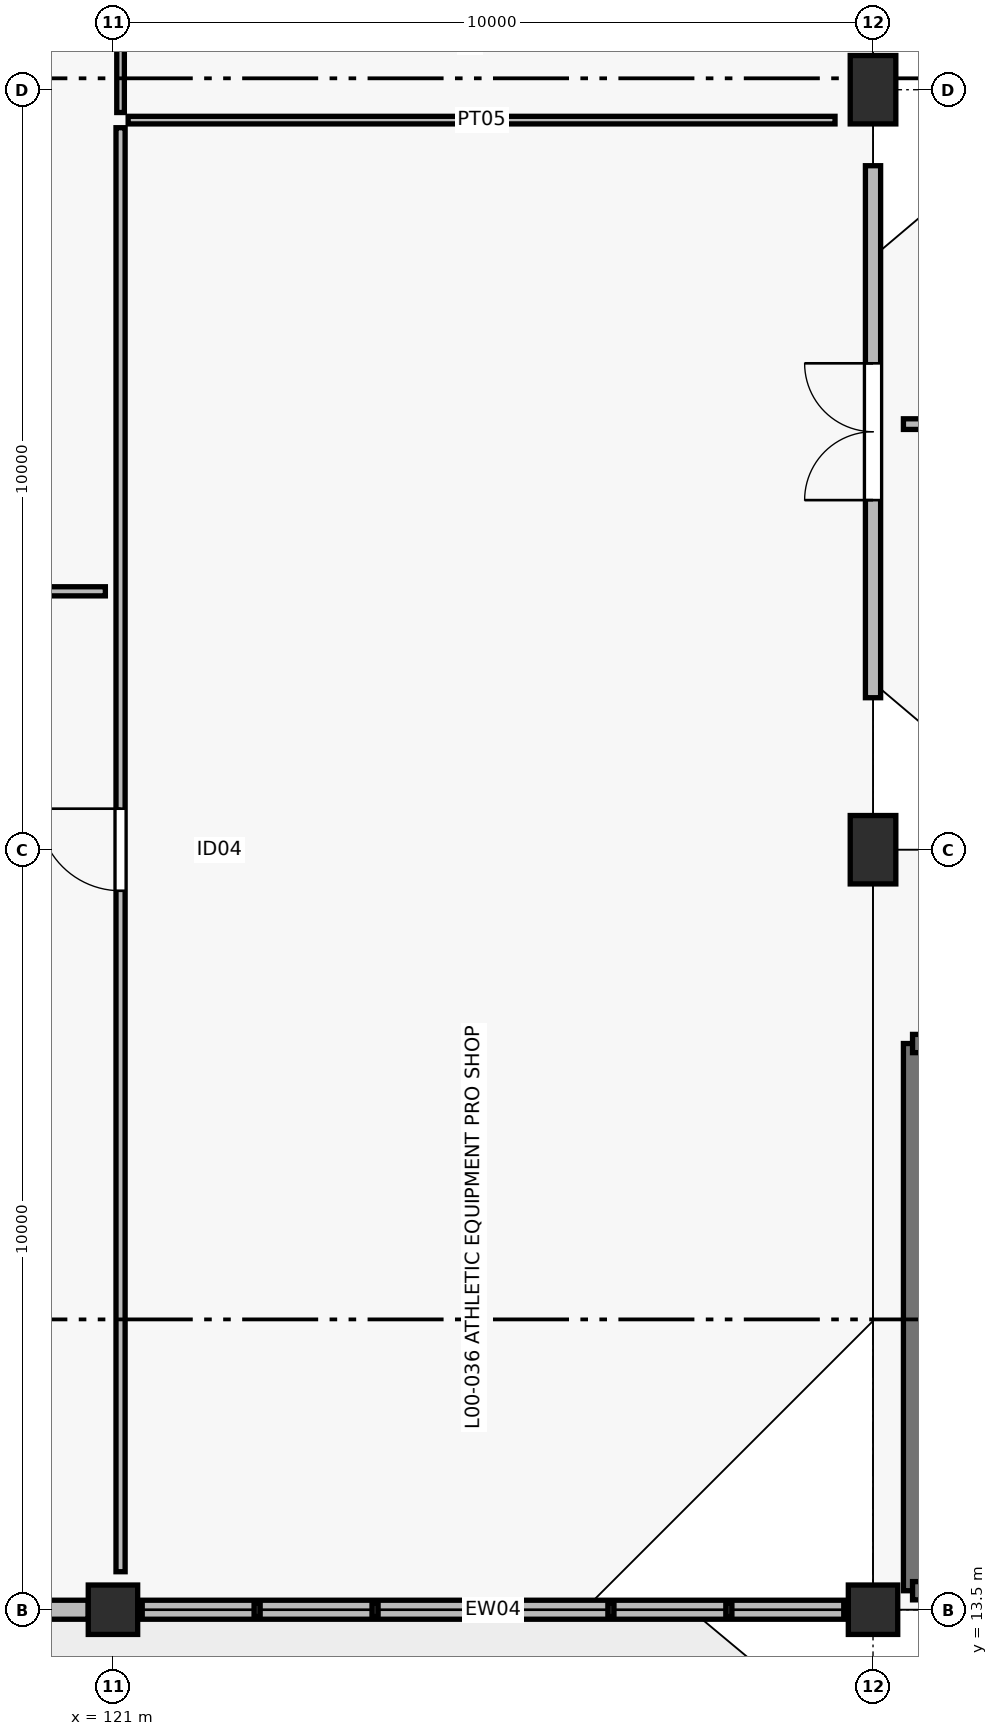
"""IFC4 building model, lengths in metres.
Left out: names, types, materials, properties, quantities, classifications, styles, units other than length and angle.
Written with IfcOpenShell. Run it as: python <this file> out.ifc"""

import sys

from ifc_helpers import new_model, si_unit, direction, frame, frame_2d, origin, origin_2d, place, context, subcontext, project, spatial, rectangle, extrude, element, fill, save


model = new_model("IFC4")
c1 = context("Model", 3, precision=1e-05, world=origin(), true_north=direction((0.0, 1.0)))
c2 = subcontext(c1, "Body", "Model", "MODEL_VIEW")
j1 = project(units=[si_unit("LENGTHUNIT", "METRE"), si_unit("PLANEANGLEUNIT", "RADIAN")], contexts=[c1])
p1 = place(None, origin())
s1 = spatial("IfcSite", under=j1, at=p1, CompositionType="ELEMENT")
p2 = place(p1, origin())
s2 = spatial("IfcBuilding", under=s1, at=p2, CompositionType="ELEMENT")
p3 = place(p2, origin())
s3 = spatial("IfcBuildingStorey", under=s2, at=p3, CompositionType="ELEMENT", Elevation=0.0)
for number, where, z_axis, x_axis in (
    (1, (121.0, 13.5, 0.0), (0.0, 0.0, 1.0), (1.0, 0.0, 0.0)),
    (2, (131.0, 13.5, 0.0), (0.0, 0.0, 1.0), (1.0, 0.0, 0.0)),
):
    element("IfcColumn", number, at=place(p3, frame(where, z_axis=z_axis, x_axis=x_axis)), inside=s3, PredefinedType="COLUMN", context=c2, shape_type="SweptSolid", body=[
        extrude(rectangle(XDim=0.65, YDim=0.65, at=origin_2d()), origin(), (0.0, 0.0, 1.0), 4.8),
    ])
for number, where, z_axis, x_axis in (
    (3, (131.0, 23.5, 0.0), (0.0, 0.0, 1.0), (1.0, 0.0, 0.0)),
    (4, (131.0, 33.5, 0.0), (0.0, 0.0, 1.0), (1.0, 0.0, 0.0)),
):
    element("IfcColumn", number, at=place(p3, frame(where, z_axis=z_axis, x_axis=x_axis)), inside=s3, PredefinedType="COLUMN", context=c2, shape_type="SweptSolid", body=[
        extrude(rectangle(XDim=0.6, YDim=0.9, at=origin_2d()), origin(), (0.0, 0.0, 1.0), 4.8),
    ])
p4 = place(p3, frame((120.675, 13.5, 0.0), z_axis=(0.0, 0.0, 1.0), x_axis=(-1.0, 0.0, 0.0)))
e5 = element("IfcWall", 5, at=p4, inside=s3, PredefinedType="SOLIDWALL", context=c2, shape_type="SweptSolid", body=[
    extrude(rectangle(XDim=9.35, YDim=0.25, at=frame_2d((4.675, 0.0))), origin(), (0.0, 0.0, 1.0), 2.605),
])
p5 = place(p4, frame((3.5, 0.0, 0.0)))
e6 = element("IfcOpeningElement", 6, at=p5, cuts=e5, PredefinedType="OPENING", context=c2, shape_type="SweptSolid", body=[
    extrude(rectangle(XDim=2.2, YDim=2.4, at=frame_2d((1.1, 1.2))), frame((0.0, 0.135, 0.0), z_axis=(0.0, -1.0, 0.0), x_axis=(1.0, 0.0, 0.0)), (0.0, 0.0, 1.0), 0.27),
])
p6 = place(p4, frame((0.9, 0.0, 0.85)))
e7 = element("IfcOpeningElement", 7, at=p6, cuts=e5, PredefinedType="OPENING", context=c2, shape_type="SweptSolid", body=[
    extrude(rectangle(XDim=1.35, YDim=1.5, at=frame_2d((0.675, 0.75))), frame((0.0, 0.135, 0.0), z_axis=(0.0, -1.0, 0.0), x_axis=(1.0, 0.0, 0.0)), (0.0, 0.0, 1.0), 0.27),
])
p7 = place(p3, frame((130.675, 13.5, 0.0), z_axis=(0.0, 0.0, 1.0), x_axis=(-1.0, 0.0, 0.0)))
e8 = element("IfcWall", 8, at=p7, inside=s3, PredefinedType="SOLIDWALL", context=c2, shape_type="SweptSolid", body=[
    extrude(rectangle(XDim=9.35, YDim=0.25, at=frame_2d((4.675, 0.0))), origin(), (0.0, 0.0, 1.0), 2.605),
])
p8 = place(p3, frame((131.52, 13.75, 0.0), z_axis=(0.0, 0.0, 1.0), x_axis=(0.0, 1.0, 0.0)))
e9 = element("IfcWall", 9, at=p8, inside=s3, PredefinedType="SHEAR", context=c2, shape_type="SweptSolid", body=[
    extrude(rectangle(XDim=7.2, YDim=0.24, at=frame_2d((3.6, 0.0))), origin(), (0.0, 0.0, 1.0), 4.8),
])
p9 = place(p3, frame((131.52, 20.95, 0.0), z_axis=(0.0, 0.0, 1.0), x_axis=(1.0, 0.0, 0.0)))
e10 = element("IfcWall", 10, at=p9, inside=s3, PredefinedType="SHEAR", context=c2, shape_type="SweptSolid", body=[
    extrude(rectangle(XDim=4.16, YDim=0.24, at=frame_2d((2.08, 0.0))), origin(), (0.0, 0.0, 1.0), 4.8),
])
p10 = place(p3, frame((131.52, 13.75, 0.0), z_axis=(0.0, 0.0, 1.0), x_axis=(1.0, 0.0, 0.0)))
e11 = element("IfcWall", 11, at=p10, inside=s3, PredefinedType="SHEAR", context=c2, shape_type="SweptSolid", body=[
    extrude(rectangle(XDim=4.16, YDim=0.24, at=frame_2d((2.08, 0.0))), origin(), (0.0, 0.0, 1.0), 4.8),
])
p11 = place(p10, frame((0.35, 0.0, 0.0)))
e12 = element("IfcOpeningElement", 12, at=p11, cuts=e11, PredefinedType="OPENING", context=c2, shape_type="SweptSolid", body=[
    extrude(rectangle(XDim=1.0, YDim=2.15, at=frame_2d((0.5, 1.075))), frame((0.0, 0.13, 0.0), z_axis=(0.0, -1.0, 0.0), x_axis=(1.0, 0.0, 0.0)), (0.0, 0.0, 1.0), 0.26),
])
p12 = place(p3, frame((131.4, 29.1, 0.0), z_axis=(0.0, 0.0, 1.0), x_axis=(1.0, 0.0, 0.0)))
e13 = element("IfcWall", 13, at=p12, inside=s3, PredefinedType="PARTITIONING", context=c2, shape_type="SweptSolid", body=[
    extrude(rectangle(XDim=5.4, YDim=0.14, at=frame_2d((2.7, 0.0))), origin(), (0.0, 0.0, 1.0), 2.605),
])
p13 = place(p12, frame((0.6, 0.0, 0.0)))
e14 = element("IfcOpeningElement", 14, at=p13, cuts=e13, PredefinedType="OPENING", context=c2, shape_type="SweptSolid", body=[
    extrude(rectangle(XDim=0.98, YDim=2.1, at=frame_2d((0.49, 1.05))), frame((0.0, 0.08, 0.0), z_axis=(0.0, -1.0, 0.0), x_axis=(1.0, 0.0, 0.0)), (0.0, 0.0, 1.0), 0.16),
])
p14 = place(p3, frame((131.0, 25.5, 0.0), z_axis=(0.0, 0.0, 1.0), x_axis=(0.0, 1.0, 0.0)))
e15 = element("IfcWall", 15, at=p14, inside=s3, PredefinedType="PARTITIONING", context=c2, shape_type="SweptSolid", body=[
    extrude(rectangle(XDim=7.0, YDim=0.2, at=frame_2d((3.5, 0.0))), origin(), (0.0, 0.0, 1.0), 2.605),
])
p15 = place(p14, frame((2.6, 0.0, 0.0)))
e16 = element("IfcOpeningElement", 16, at=p15, cuts=e15, PredefinedType="OPENING", context=c2, shape_type="SweptSolid", body=[
    extrude(rectangle(XDim=1.8, YDim=2.25, at=frame_2d((0.9, 1.125))), frame((0.0, 0.11, 0.0), z_axis=(0.0, -1.0, 0.0), x_axis=(1.0, 0.0, 0.0)), (0.0, 0.0, 1.0), 0.22),
])
p16 = place(p3, frame((106.3, 26.9, 0.0), z_axis=(0.0, 0.0, 1.0), x_axis=(1.0, 0.0, 0.0)))
e17 = element("IfcWall", 17, at=p16, inside=s3, PredefinedType="PARTITIONING", context=c2, shape_type="SweptSolid", body=[
    extrude(rectangle(XDim=14.6, YDim=0.12, at=frame_2d((7.3, 0.0))), origin(), (0.0, 0.0, 1.0), 2.605),
])
p17 = place(p3, frame((121.1, 14.0, 0.0), z_axis=(0.0, 0.0, 1.0), x_axis=(0.0, 1.0, 0.0)))
e18 = element("IfcWall", 18, at=p17, inside=s3, PredefinedType="PARTITIONING", context=c2, shape_type="SweptSolid", body=[
    extrude(rectangle(XDim=19.0, YDim=0.12, at=frame_2d((9.5, 0.0))), origin(), (0.0, 0.0, 1.0), 2.605),
])
p18 = place(p17, frame((8.96, 0.0, 0.0)))
e19 = element("IfcOpeningElement", 19, at=p18, cuts=e18, PredefinedType="OPENING", context=c2, shape_type="SweptSolid", body=[
    extrude(rectangle(XDim=1.08, YDim=2.15, at=frame_2d((0.54, 1.075))), frame((0.0, 0.07, 0.0), z_axis=(0.0, -1.0, 0.0), x_axis=(1.0, 0.0, 0.0)), (0.0, 0.0, 1.0), 0.14),
])
p19 = place(p3, frame((121.1, 33.2, 0.0), z_axis=(0.0, 0.0, 1.0), x_axis=(0.0, 1.0, 0.0)))
e20 = element("IfcWall", 20, at=p19, inside=s3, PredefinedType="PARTITIONING", context=c2, shape_type="SweptSolid", body=[
    extrude(rectangle(XDim=9.8, YDim=0.1, at=frame_2d((4.9, 0.0))), origin(), (0.0, 0.0, 1.0), 2.605),
])
p20 = place(p19, frame((4.34, 0.0, 0.0)))
e21 = element("IfcOpeningElement", 21, at=p20, cuts=e20, PredefinedType="OPENING", context=c2, shape_type="SweptSolid", body=[
    extrude(rectangle(XDim=1.12, YDim=2.15, at=frame_2d((0.56, 1.075))), frame((0.0, 0.06, 0.0), z_axis=(0.0, -1.0, 0.0), x_axis=(1.0, 0.0, 0.0)), (0.0, 0.0, 1.0), 0.12),
])
p21 = place(p3, frame((121.2, 33.1, 0.0), z_axis=(0.0, 0.0, 1.0), x_axis=(1.0, 0.0, 0.0)))
e22 = element("IfcWall", 22, at=p21, inside=s3, PredefinedType="PARTITIONING", context=c2, shape_type="SweptSolid", body=[
    extrude(rectangle(XDim=9.3, YDim=0.1, at=frame_2d((4.65, 0.0))), origin(), (0.0, 0.0, 1.0), 2.605),
])
p22 = place(p15, origin())
e23 = element("IfcDoor", 23, at=p22, inside=s3, OperationType="DOUBLE_DOOR_SINGLE_SWING", PredefinedType="DOOR", context=c2, shape_type="SweptSolid", body=[
    extrude(rectangle(XDim=1.8, YDim=2.25, at=frame_2d((0.9, 1.125))), frame((0.0, 0.025, 0.0), z_axis=(0.0, -1.0, 0.0), x_axis=(1.0, 0.0, 0.0)), (0.0, 0.0, 1.0), 0.05),
])
fill(e16, e23)
p23 = place(p18, origin())
e24 = element("IfcDoor", 24, at=p23, inside=s3, OperationType="SINGLE_SWING_RIGHT", PredefinedType="DOOR", context=c2, shape_type="SweptSolid", body=[
    extrude(rectangle(XDim=1.08, YDim=2.15, at=frame_2d((0.54, 1.075))), frame((0.0, 0.025, 0.0), z_axis=(0.0, -1.0, 0.0), x_axis=(1.0, 0.0, 0.0)), (0.0, 0.0, 1.0), 0.05),
])
fill(e19, e24)
save(model, sys.argv[1])
